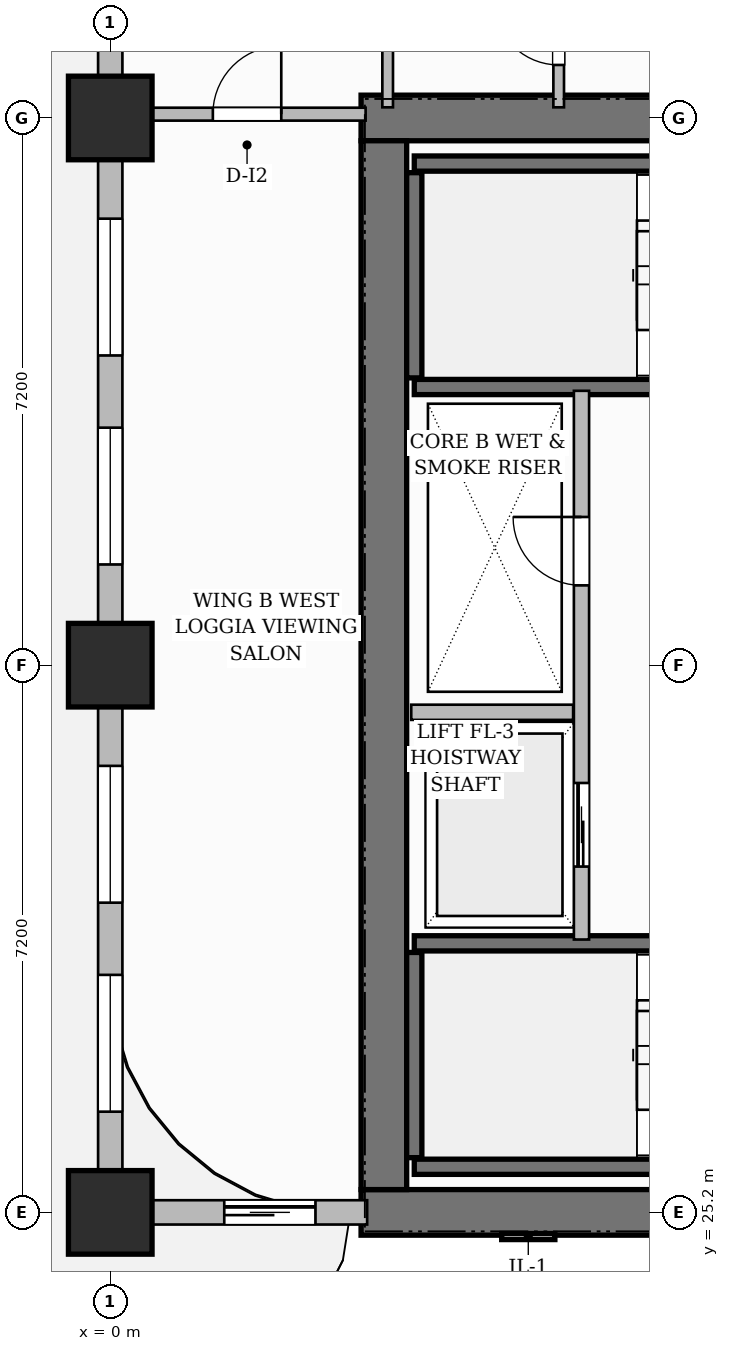
"""IFC4 building model, lengths in metres.
Left out: names, types, materials, properties, quantities, classifications, styles, units other than length and angle.
Written with IfcOpenShell. Run it as: python <this file> out.ifc"""

import sys

from ifc_helpers import new_model, si_unit, direction, frame, frame_2d, origin, origin_2d, place, context, subcontext, project, spatial, rectangle, extrude, source, transform, mapped, element, fill, save


model = new_model("IFC4")
c1 = context("Model", 3, precision=1e-05, world=origin(), true_north=direction((0.0, 1.0)))
c2 = subcontext(c1, "Body", "Model", "MODEL_VIEW")
j1 = project(units=[si_unit("LENGTHUNIT", "METRE"), si_unit("PLANEANGLEUNIT", "RADIAN")], contexts=[c1])
p1 = place(None, origin())
s1 = spatial("IfcSite", under=j1, at=p1, CompositionType="ELEMENT")
p2 = place(p1, origin())
s2 = spatial("IfcBuilding", under=s1, at=p2, CompositionType="ELEMENT")
p3 = place(p2, frame((0.0, 0.0, 54.6)))
s3 = spatial("IfcBuildingStorey", under=s2, at=p3, CompositionType="ELEMENT", Elevation=54.6)
for number, where, z_axis, x_axis in (
    (1, (3.3, 25.2, 0.0), (0.0, 0.0, 1.0), (1.0, 0.0, 0.0)),
    (2, (3.3, 39.6, 0.0), (0.0, 0.0, 1.0), (1.0, 0.0, 0.0)),
):
    element("IfcWall", number, at=place(p3, frame(where, z_axis=z_axis, x_axis=x_axis)), inside=s3, PredefinedType="SHEAR", context=c2, shape_type="SweptSolid", body=[
        extrude(rectangle(XDim=8.4, YDim=0.6, at=frame_2d((4.2, 0.0))), origin(), (0.0, 0.0, 1.0), 3.7),
    ])
p4 = place(p3, frame((3.6, 25.5, 0.0), z_axis=(0.0, 0.0, 1.0), x_axis=(0.0, 1.0, 0.0)))
e3 = element("IfcWall", 3, at=p4, inside=s3, PredefinedType="SHEAR", context=c2, shape_type="SweptSolid", body=[
    extrude(rectangle(XDim=13.8, YDim=0.6, at=frame_2d((6.9, 0.0))), origin(), (0.0, 0.0, 1.0), 3.7),
])
m1 = source(origin(), c2, "Body", "SweptSolid", [
    extrude(rectangle(XDim=1.1, YDim=1.1, at=origin_2d()), origin(), (0.0, 0.0, 1.0), 3.7),
])
for number, where, z_axis, x_axis in (
    (4, (0.0, 25.2, 0.0), (0.0, 0.0, 1.0), (1.0, 0.0, 0.0)),
    (5, (0.0, 32.4, 0.0), (0.0, 0.0, 1.0), (1.0, 0.0, 0.0)),
    (6, (0.0, 39.6, 0.0), (0.0, 0.0, 1.0), (1.0, 0.0, 0.0)),
):
    element("IfcColumn", number, at=place(p3, frame(where, z_axis=z_axis, x_axis=x_axis)), inside=s3, PredefinedType="COLUMN", context=c2, shape_type="MappedRepresentation", body=[
        mapped(m1, transform((0.0, 0.0, 0.0), scale=1.0)),
    ])
p5 = place(p3, frame((4.0, 25.8, 0.0), z_axis=(0.0, 0.0, 1.0), x_axis=(1.0, 0.0, 0.0)))
e7 = element("IfcWall", 7, at=p5, inside=s3, PredefinedType="SHEAR", context=c2, shape_type="SweptSolid", body=[
    extrude(rectangle(XDim=7.1, YDim=0.2, at=frame_2d((3.55, 0.0))), origin(), (0.0, 0.0, 1.0), 3.7),
])
p6 = place(p3, frame((4.0, 25.92, 0.0), z_axis=(0.0, 0.0, 1.0), x_axis=(0.0, 1.0, 0.0)))
e8 = element("IfcWall", 8, at=p6, inside=s3, PredefinedType="SHEAR", context=c2, shape_type="SweptSolid", body=[
    extrude(rectangle(XDim=2.7, YDim=0.2, at=frame_2d((1.35, 0.0))), origin(), (0.0, 0.0, 1.0), 3.7),
])
p7 = place(p3, frame((4.0, 28.74, 0.0), z_axis=(0.0, 0.0, 1.0), x_axis=(1.0, 0.0, 0.0)))
e9 = element("IfcWall", 9, at=p7, inside=s3, PredefinedType="SHEAR", context=c2, shape_type="SweptSolid", body=[
    extrude(rectangle(XDim=7.1, YDim=0.2, at=frame_2d((3.55, 0.0))), origin(), (0.0, 0.0, 1.0), 3.7),
])
p8 = place(p7, frame((5.815, 0.0, 0.0)))
e10 = element("IfcOpeningElement", 10, at=p8, cuts=e9, PredefinedType="OPENING", context=c2, shape_type="SweptSolid", body=[
    extrude(rectangle(XDim=1.05, YDim=2.2, at=frame_2d((0.525, 1.1))), frame((0.0, 0.11, 0.0), z_axis=(0.0, -1.0, 0.0), x_axis=(1.0, 0.0, 0.0)), (0.0, 0.0, 1.0), 0.22),
])
p9 = place(p3, frame((4.0, 39.0, 0.0), z_axis=(0.0, 0.0, 1.0), x_axis=(1.0, 0.0, 0.0)))
e11 = element("IfcWall", 11, at=p9, inside=s3, PredefinedType="SHEAR", context=c2, shape_type="SweptSolid", body=[
    extrude(rectangle(XDim=7.1, YDim=0.2, at=frame_2d((3.55, 0.0))), origin(), (0.0, 0.0, 1.0), 3.7),
])
p10 = place(p3, frame((4.0, 36.18, 0.0), z_axis=(0.0, 0.0, 1.0), x_axis=(0.0, 1.0, 0.0)))
e12 = element("IfcWall", 12, at=p10, inside=s3, PredefinedType="SHEAR", context=c2, shape_type="SweptSolid", body=[
    extrude(rectangle(XDim=2.7, YDim=0.2, at=frame_2d((1.35, 0.0))), origin(), (0.0, 0.0, 1.0), 3.7),
])
p11 = place(p3, frame((4.0, 36.06, 0.0), z_axis=(0.0, 0.0, 1.0), x_axis=(1.0, 0.0, 0.0)))
e13 = element("IfcWall", 13, at=p11, inside=s3, PredefinedType="SHEAR", context=c2, shape_type="SweptSolid", body=[
    extrude(rectangle(XDim=7.1, YDim=0.2, at=frame_2d((3.55, 0.0))), origin(), (0.0, 0.0, 1.0), 3.7),
])
p12 = place(p11, frame((5.815, 0.0, 0.0)))
e14 = element("IfcOpeningElement", 14, at=p12, cuts=e13, PredefinedType="OPENING", context=c2, shape_type="SweptSolid", body=[
    extrude(rectangle(XDim=1.05, YDim=2.2, at=frame_2d((0.525, 1.1))), frame((0.0, 0.11, 0.0), z_axis=(0.0, -1.0, 0.0), x_axis=(1.0, 0.0, 0.0)), (0.0, 0.0, 1.0), 0.22),
])
p13 = place(p3, frame((6.2, 28.79, 0.0), z_axis=(0.0, 0.0, 1.0), x_axis=(0.0, 1.0, 0.0)))
e15 = element("IfcWall", 15, at=p13, inside=s3, PredefinedType="PARTITIONING", context=c2, shape_type="SweptSolid", body=[
    extrude(rectangle(XDim=7.22, YDim=0.2, at=frame_2d((3.61, 0.0))), origin(), (0.0, 0.0, 1.0), 3.45),
])
p14 = place(p13, frame((4.66, 0.0, 0.0)))
e16 = element("IfcOpeningElement", 16, at=p14, cuts=e15, PredefinedType="OPENING", context=c2, shape_type="SweptSolid", body=[
    extrude(rectangle(XDim=0.9, YDim=2.1, at=frame_2d((0.45, 1.05))), frame((0.0, 0.11, 0.0), z_axis=(0.0, -1.0, 0.0), x_axis=(1.0, 0.0, 0.0)), (0.0, 0.0, 1.0), 0.22),
])
p15 = place(p13, frame((0.96, 0.0, 0.0)))
e17 = element("IfcOpeningElement", 17, at=p15, cuts=e15, PredefinedType="OPENING", context=c2, shape_type="SweptSolid", body=[
    extrude(rectangle(XDim=1.1, YDim=2.2, at=frame_2d((0.55, 1.1))), frame((0.0, 0.11, 0.0), z_axis=(0.0, -1.0, 0.0), x_axis=(1.0, 0.0, 0.0)), (0.0, 0.0, 1.0), 0.22),
])
p16 = place(p3, frame((3.96, 31.78, 0.0), z_axis=(0.0, 0.0, 1.0), x_axis=(1.0, 0.0, 0.0)))
e18 = element("IfcWall", 18, at=p16, inside=s3, PredefinedType="PARTITIONING", context=c2, shape_type="SweptSolid", body=[
    extrude(rectangle(XDim=2.13, YDim=0.2, at=frame_2d((1.065, 0.0))), origin(), (0.0, 0.0, 1.0), 3.45),
])
p17 = place(p3, frame((0.24, 39.65, 0.0), z_axis=(0.0, 0.0, 1.0), x_axis=(1.0, 0.0, 0.0)))
e19 = element("IfcWall", 19, at=p17, inside=s3, PredefinedType="PARTITIONING", context=c2, shape_type="SweptSolid", body=[
    extrude(rectangle(XDim=3.12, YDim=0.17, at=frame_2d((1.56, 0.0))), origin(), (0.0, 0.0, 1.0), 3.45),
])
p18 = place(p17, frame((1.11, 0.0, 0.0)))
e20 = element("IfcOpeningElement", 20, at=p18, cuts=e19, PredefinedType="OPENING", context=c2, shape_type="SweptSolid", body=[
    extrude(rectangle(XDim=0.9, YDim=2.15, at=frame_2d((0.45, 1.075))), frame((0.0, 0.095, 0.0), z_axis=(0.0, -1.0, 0.0), x_axis=(1.0, 0.0, 0.0)), (0.0, 0.0, 1.0), 0.19),
])
p19 = place(p3, frame((3.65, 39.74, 0.0), z_axis=(0.0, 0.0, 1.0), x_axis=(0.0, 1.0, 0.0)))
e21 = element("IfcWall", 21, at=p19, inside=s3, PredefinedType="PARTITIONING", context=c2, shape_type="SweptSolid", body=[
    extrude(rectangle(XDim=1.965, YDim=0.14, at=frame_2d((0.982, 0.0))), origin(), (0.0, 0.0, 1.0), 3.45),
])
p20 = place(p3, frame((5.9, 39.74, 0.0), z_axis=(0.0, 0.0, 1.0), x_axis=(0.0, 1.0, 0.0)))
e22 = element("IfcWall", 22, at=p20, inside=s3, PredefinedType="PARTITIONING", context=c2, shape_type="SweptSolid", body=[
    extrude(rectangle(XDim=1.965, YDim=0.14, at=frame_2d((0.982, 0.0))), origin(), (0.0, 0.0, 1.0), 3.45),
])
p21 = place(p20, frame((0.558, 0.0, 0.0)))
e23 = element("IfcOpeningElement", 23, at=p21, cuts=e22, PredefinedType="OPENING", context=c2, shape_type="SweptSolid", body=[
    extrude(rectangle(XDim=0.85, YDim=2.1, at=frame_2d((0.425, 1.05))), frame((0.0, 0.08, 0.0), z_axis=(0.0, -1.0, 0.0), x_axis=(1.0, 0.0, 0.0)), (0.0, 0.0, 1.0), 0.16),
])
p22 = place(p3, frame((0.0, 25.2, 0.0), z_axis=(0.0, 0.0, 1.0), x_axis=(1.0, 0.0, 0.0)))
e24 = element("IfcWall", 24, at=p22, inside=s3, PredefinedType="SOLIDWALL", context=c2, shape_type="SweptSolid", body=[
    extrude(rectangle(XDim=3.38, YDim=0.32, at=frame_2d((1.69, 0.0))), origin(), (0.0, 0.0, 1.0), 3.45),
])
p23 = place(p22, frame((1.5, 0.0, 0.0)))
e25 = element("IfcOpeningElement", 25, at=p23, cuts=e24, PredefinedType="OPENING", context=c2, shape_type="SweptSolid", body=[
    extrude(rectangle(XDim=1.2, YDim=2.2, at=frame_2d((0.6, 1.1))), frame((0.0, 0.17, 0.0), z_axis=(0.0, -1.0, 0.0), x_axis=(1.0, 0.0, 0.0)), (0.0, 0.0, 1.0), 0.34),
])
p24 = place(p3, frame((0.0, 25.25, 0.0), z_axis=(0.0, 0.0, 1.0), x_axis=(0.0, 1.0, 0.0)))
e26 = element("IfcWall", 26, at=p24, inside=s3, PredefinedType="SOLIDWALL", context=c2, shape_type="SweptSolid", body=[
    extrude(rectangle(XDim=21.5, YDim=0.32, at=frame_2d((10.75, 0.0))), origin(), (0.0, 0.0, 1.0), 2.885),
])
p25 = place(p24, frame((1.275, 0.0, 0.8)))
e27 = element("IfcOpeningElement", 27, at=p25, cuts=e26, PredefinedType="OPENING", context=c2, shape_type="SweptSolid", body=[
    extrude(rectangle(XDim=1.8, YDim=1.85, at=frame_2d((0.9, 0.925))), frame((0.0, 0.17, 0.0), z_axis=(0.0, -1.0, 0.0), x_axis=(1.0, 0.0, 0.0)), (0.0, 0.0, 1.0), 0.34),
])
p26 = place(p24, frame((4.025, 0.0, 0.8)))
e28 = element("IfcOpeningElement", 28, at=p26, cuts=e26, PredefinedType="OPENING", context=c2, shape_type="SweptSolid", body=[
    extrude(rectangle(XDim=1.8, YDim=1.85, at=frame_2d((0.9, 0.925))), frame((0.0, 0.17, 0.0), z_axis=(0.0, -1.0, 0.0), x_axis=(1.0, 0.0, 0.0)), (0.0, 0.0, 1.0), 0.34),
])
p27 = place(p24, frame((8.475, 0.0, 0.8)))
e29 = element("IfcOpeningElement", 29, at=p27, cuts=e26, PredefinedType="OPENING", context=c2, shape_type="SweptSolid", body=[
    extrude(rectangle(XDim=1.8, YDim=1.85, at=frame_2d((0.9, 0.925))), frame((0.0, 0.17, 0.0), z_axis=(0.0, -1.0, 0.0), x_axis=(1.0, 0.0, 0.0)), (0.0, 0.0, 1.0), 0.34),
])
p28 = place(p24, frame((11.225, 0.0, 0.8)))
e30 = element("IfcOpeningElement", 30, at=p28, cuts=e26, PredefinedType="OPENING", context=c2, shape_type="SweptSolid", body=[
    extrude(rectangle(XDim=1.8, YDim=1.85, at=frame_2d((0.9, 0.925))), frame((0.0, 0.17, 0.0), z_axis=(0.0, -1.0, 0.0), x_axis=(1.0, 0.0, 0.0)), (0.0, 0.0, 1.0), 0.34),
])
p29 = place(p24, frame((15.821, 0.0, 0.8)))
e31 = element("IfcOpeningElement", 31, at=p29, cuts=e26, PredefinedType="OPENING", context=c2, shape_type="SweptSolid", body=[
    extrude(rectangle(XDim=1.8, YDim=1.85, at=frame_2d((0.9, 0.925))), frame((0.0, 0.17, 0.0), z_axis=(0.0, -1.0, 0.0), x_axis=(1.0, 0.0, 0.0)), (0.0, 0.0, 1.0), 0.34),
])
p30 = place(p24, frame((18.829, 0.0, 0.8)))
e32 = element("IfcOpeningElement", 32, at=p30, cuts=e26, PredefinedType="OPENING", context=c2, shape_type="SweptSolid", body=[
    extrude(rectangle(XDim=1.4, YDim=1.85, at=frame_2d((0.7, 0.925))), frame((0.0, 0.17, 0.0), z_axis=(0.0, -1.0, 0.0), x_axis=(1.0, 0.0, 0.0)), (0.0, 0.0, 1.0), 0.34),
])
m2 = source(origin(), c2, "Body", "SweptSolid", [
    extrude(rectangle(XDim=0.9, YDim=2.1, at=frame_2d((0.45, 1.05))), frame((0.0, 0.025, 0.0), z_axis=(0.0, -1.0, 0.0), x_axis=(1.0, 0.0, 0.0)), (0.0, 0.0, 1.0), 0.05),
])
p31 = place(p14, origin())
e33 = element("IfcDoor", 33, at=p31, inside=s3, OperationType="SINGLE_SWING_RIGHT", PredefinedType="DOOR", context=c2, shape_type="MappedRepresentation", body=[
    mapped(m2, transform((0.0, 0.0, 0.0), scale=1.0)),
])
fill(e16, e33)
m3 = source(origin(), c2, "Body", "SweptSolid", [
    extrude(rectangle(XDim=0.9, YDim=2.15, at=frame_2d((0.45, 1.075))), frame((0.0, 0.025, 0.0), z_axis=(0.0, -1.0, 0.0), x_axis=(1.0, 0.0, 0.0)), (0.0, 0.0, 1.0), 0.05),
])
p32 = place(p18, origin())
e34 = element("IfcDoor", 34, at=p32, inside=s3, OperationType="SINGLE_SWING_RIGHT", PredefinedType="DOOR", context=c2, shape_type="MappedRepresentation", body=[
    mapped(m3, transform((0.0, 0.0, 0.0), scale=1.0)),
])
fill(e20, e34)
m4 = source(origin(), c2, "Body", "SweptSolid", [
    extrude(rectangle(XDim=0.85, YDim=2.1, at=frame_2d((0.425, 1.05))), frame((0.0, 0.025, 0.0), z_axis=(0.0, -1.0, 0.0), x_axis=(1.0, 0.0, 0.0)), (0.0, 0.0, 1.0), 0.05),
])
p33 = place(p21, origin())
e35 = element("IfcDoor", 35, at=p33, inside=s3, OperationType="SINGLE_SWING_RIGHT", PredefinedType="DOOR", context=c2, shape_type="MappedRepresentation", body=[
    mapped(m4, transform((0.0, 0.0, 0.0), scale=1.0)),
])
fill(e23, e35)
m5 = source(origin(), c2, "Body", "SweptSolid", [
    extrude(rectangle(XDim=1.1, YDim=2.2, at=frame_2d((0.55, 1.1))), frame((0.0, 0.025, 0.0), z_axis=(0.0, -1.0, 0.0), x_axis=(1.0, 0.0, 0.0)), (0.0, 0.0, 1.0), 0.05),
])
p34 = place(p15, origin())
e36 = element("IfcDoor", 36, at=p34, inside=s3, OperationType="SLIDING_TO_LEFT", PredefinedType="DOOR", context=c2, shape_type="MappedRepresentation", body=[
    mapped(m5, transform((0.0, 0.0, 0.0), scale=1.0)),
])
fill(e17, e36)
m6 = source(origin(), c2, "Body", "SweptSolid", [
    extrude(rectangle(XDim=1.2, YDim=2.2, at=frame_2d((0.6, 1.1))), frame((0.0, 0.025, 0.0), z_axis=(0.0, -1.0, 0.0), x_axis=(1.0, 0.0, 0.0)), (0.0, 0.0, 1.0), 0.05),
])
p35 = place(p23, origin())
e37 = element("IfcDoor", 37, at=p35, inside=s3, OperationType="SLIDING_TO_LEFT", PredefinedType="DOOR", context=c2, shape_type="MappedRepresentation", body=[
    mapped(m6, transform((0.0, 0.0, 0.0), scale=1.0)),
])
fill(e25, e37)
m7 = source(origin(), c2, "Body", "SweptSolid", [
    extrude(rectangle(XDim=1.8, YDim=1.85, at=frame_2d((0.9, 0.925))), frame((0.0, 0.03, 0.0), z_axis=(0.0, -1.0, 0.0), x_axis=(1.0, 0.0, 0.0)), (0.0, 0.0, 1.0), 0.06),
])
p36 = place(p25, origin())
e38 = element("IfcWindow", 38, at=p36, inside=s3, PartitioningType="DOUBLE_PANEL_VERTICAL", PredefinedType="WINDOW", context=c2, shape_type="MappedRepresentation", body=[
    mapped(m7, transform((0.0, 0.0, 0.0), scale=1.0)),
])
fill(e27, e38)
p37 = place(p26, origin())
e39 = element("IfcWindow", 39, at=p37, inside=s3, PartitioningType="DOUBLE_PANEL_VERTICAL", PredefinedType="WINDOW", context=c2, shape_type="MappedRepresentation", body=[
    mapped(m7, transform((0.0, 0.0, 0.0), scale=1.0)),
])
fill(e28, e39)
p38 = place(p27, origin())
e40 = element("IfcWindow", 40, at=p38, inside=s3, PartitioningType="DOUBLE_PANEL_VERTICAL", PredefinedType="WINDOW", context=c2, shape_type="MappedRepresentation", body=[
    mapped(m7, transform((0.0, 0.0, 0.0), scale=1.0)),
])
fill(e29, e40)
p39 = place(p28, origin())
e41 = element("IfcWindow", 41, at=p39, inside=s3, PartitioningType="DOUBLE_PANEL_VERTICAL", PredefinedType="WINDOW", context=c2, shape_type="MappedRepresentation", body=[
    mapped(m7, transform((0.0, 0.0, 0.0), scale=1.0)),
])
fill(e30, e41)
save(model, sys.argv[1])
